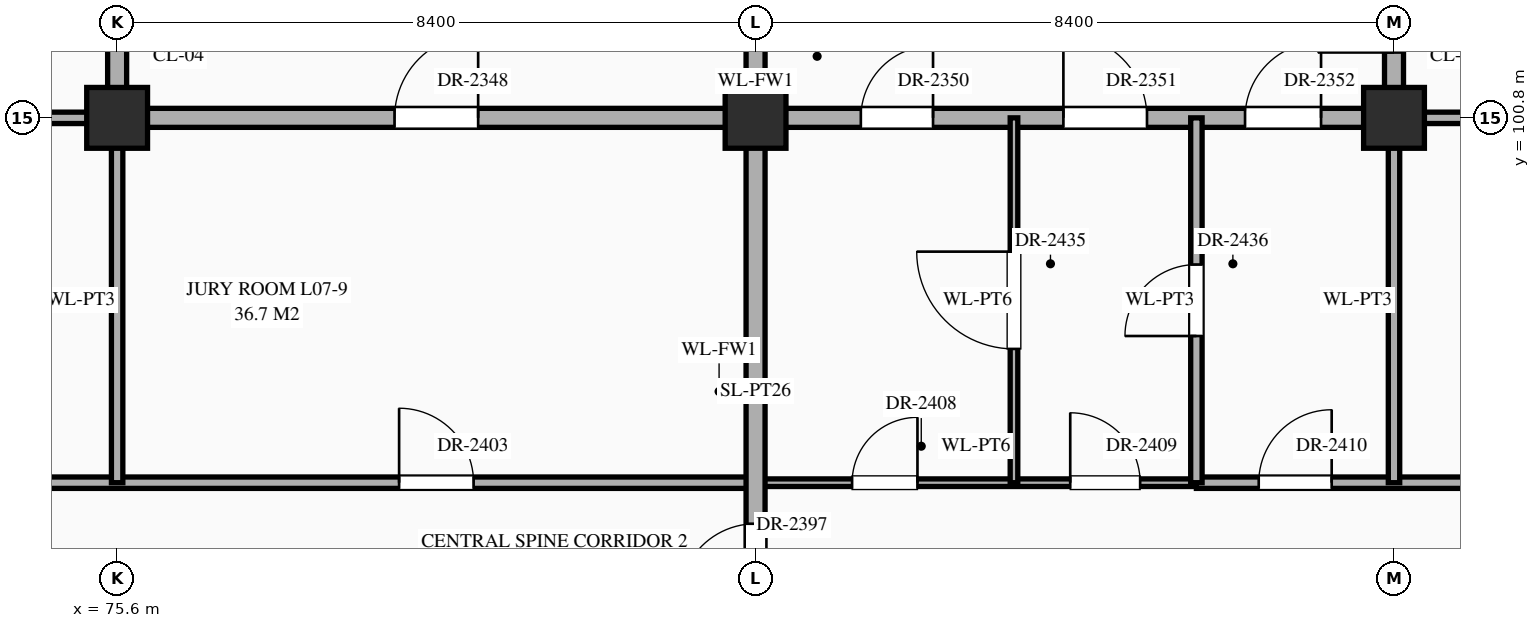
"""IFC4 building model, lengths in metres.
Left out: names, types, materials, properties, quantities, classifications, styles, units other than length and angle.
Written with IfcOpenShell. Run it as: python <this file> out.ifc"""

import sys

from ifc_helpers import new_model, si_unit, direction, frame, frame_2d, origin, origin_2d, place, context, subcontext, project, spatial, rectangle, extrude, element, fill, save


model = new_model("IFC4")
c1 = context("Model", 3, precision=1e-05, world=origin(), true_north=direction((0.0, 1.0)))
c2 = subcontext(c1, "Body", "Model", "MODEL_VIEW")
j1 = project(units=[si_unit("LENGTHUNIT", "METRE"), si_unit("PLANEANGLEUNIT", "RADIAN")], contexts=[c1])
p1 = place(None, origin())
s1 = spatial("IfcSite", under=j1, at=p1, CompositionType="ELEMENT")
p2 = place(p1, origin())
s2 = spatial("IfcBuilding", under=s1, at=p2, CompositionType="ELEMENT")
p3 = place(p2, frame((0.0, 0.0, 30.6)))
s3 = spatial("IfcBuildingStorey", under=s2, at=p3, CompositionType="ELEMENT", Elevation=30.6)
for number, where, z_axis, x_axis in (
    (1, (75.6, 100.8, 0.0), (0.0, 0.0, 1.0), (1.0, 0.0, 0.0)),
    (2, (84.0, 100.8, 0.0), (0.0, 0.0, 1.0), (1.0, 0.0, 0.0)),
    (3, (92.4, 100.8, 0.0), (0.0, 0.0, 1.0), (1.0, 0.0, 0.0)),
):
    element("IfcColumn", number, at=place(p3, frame(where, z_axis=z_axis, x_axis=x_axis)), inside=s3, PredefinedType="COLUMN", context=c2, shape_type="SweptSolid", body=[
        extrude(rectangle(XDim=0.8, YDim=0.8, at=origin_2d()), origin(), (0.0, 0.0, 1.0), 4.5),
    ])
p4 = place(p3, frame((56.2, 96.0, 0.0), z_axis=(0.0, 0.0, 1.0), x_axis=(1.0, 0.0, 0.0)))
e4 = element("IfcWall", 4, at=p4, inside=s3, PredefinedType="STANDARD", context=c2, shape_type="SweptSolid", body=[
    extrude(rectangle(XDim=27.8, YDim=0.15, at=frame_2d((13.9, 0.0))), origin(), (0.0, 0.0, 1.0), 4.24),
])
p5 = place(p4, frame((0.68, 0.0, 0.0)))
e5 = element("IfcOpeningElement", 5, at=p5, cuts=e4, PredefinedType="OPENING", context=c2, shape_type="SweptSolid", body=[
    extrude(rectangle(XDim=1.24, YDim=2.3, at=frame_2d((0.62, 1.15))), frame((0.0, 0.087, 0.0), z_axis=(0.0, -1.0, 0.0), x_axis=(1.0, 0.0, 0.0)), (0.0, 0.0, 1.0), 0.174),
])
p6 = place(p4, frame((6.16, 0.0, 0.0)))
e6 = element("IfcOpeningElement", 6, at=p6, cuts=e4, PredefinedType="OPENING", context=c2, shape_type="SweptSolid", body=[
    extrude(rectangle(XDim=1.28, YDim=2.35, at=frame_2d((0.64, 1.175))), frame((0.0, 0.087, 0.0), z_axis=(0.0, -1.0, 0.0), x_axis=(1.0, 0.0, 0.0)), (0.0, 0.0, 1.0), 0.174),
])
p7 = place(p4, frame((14.73, 0.0, 0.0)))
e7 = element("IfcOpeningElement", 7, at=p7, cuts=e4, PredefinedType="OPENING", context=c2, shape_type="SweptSolid", body=[
    extrude(rectangle(XDim=0.94, YDim=2.3, at=frame_2d((0.47, 1.15))), frame((0.0, 0.087, 0.0), z_axis=(0.0, -1.0, 0.0), x_axis=(1.0, 0.0, 0.0)), (0.0, 0.0, 1.0), 0.174),
])
p8 = place(p4, frame((23.11, 0.0, 0.0)))
e8 = element("IfcOpeningElement", 8, at=p8, cuts=e4, PredefinedType="OPENING", context=c2, shape_type="SweptSolid", body=[
    extrude(rectangle(XDim=0.98, YDim=2.35, at=frame_2d((0.49, 1.175))), frame((0.0, 0.087, 0.0), z_axis=(0.0, -1.0, 0.0), x_axis=(1.0, 0.0, 0.0)), (0.0, 0.0, 1.0), 0.174),
])
p9 = place(p3, frame((84.0, 96.0, 0.0), z_axis=(0.0, 0.0, 1.0), x_axis=(1.0, 0.0, 0.0)))
e9 = element("IfcWall", 9, at=p9, inside=s3, PredefinedType="STANDARD", context=c2, shape_type="SweptSolid", body=[
    extrude(rectangle(XDim=5.8, YDim=0.1, at=frame_2d((2.9, 0.0))), origin(), (0.0, 0.0, 1.0), 4.24),
])
p10 = place(p9, frame((1.27, 0.0, 0.0)))
e10 = element("IfcOpeningElement", 10, at=p10, cuts=e9, PredefinedType="OPENING", context=c2, shape_type="SweptSolid", body=[
    extrude(rectangle(XDim=0.86, YDim=2.1, at=frame_2d((0.43, 1.05))), frame((0.0, 0.062, 0.0), z_axis=(0.0, -1.0, 0.0), x_axis=(1.0, 0.0, 0.0)), (0.0, 0.0, 1.0), 0.124),
])
p11 = place(p9, frame((4.14, 0.0, 0.0)))
e11 = element("IfcOpeningElement", 11, at=p11, cuts=e9, PredefinedType="OPENING", context=c2, shape_type="SweptSolid", body=[
    extrude(rectangle(XDim=0.92, YDim=2.15, at=frame_2d((0.46, 1.075))), frame((0.0, 0.062, 0.0), z_axis=(0.0, -1.0, 0.0), x_axis=(1.0, 0.0, 0.0)), (0.0, 0.0, 1.0), 0.124),
])
p12 = place(p3, frame((89.8, 96.0, 0.0), z_axis=(0.0, 0.0, 1.0), x_axis=(1.0, 0.0, 0.0)))
e12 = element("IfcWall", 12, at=p12, inside=s3, PredefinedType="STANDARD", context=c2, shape_type="SweptSolid", body=[
    extrude(rectangle(XDim=19.4, YDim=0.15, at=frame_2d((9.7, 0.0))), origin(), (0.0, 0.0, 1.0), 4.24),
])
p13 = place(p12, frame((0.82, 0.0, 0.0)))
e13 = element("IfcOpeningElement", 13, at=p13, cuts=e12, PredefinedType="OPENING", context=c2, shape_type="SweptSolid", body=[
    extrude(rectangle(XDim=0.96, YDim=2.2, at=frame_2d((0.48, 1.1))), frame((0.0, 0.087, 0.0), z_axis=(0.0, -1.0, 0.0), x_axis=(1.0, 0.0, 0.0)), (0.0, 0.0, 1.0), 0.174),
])
p14 = place(p12, frame((6.3, 0.0, 0.0)))
e14 = element("IfcOpeningElement", 14, at=p14, cuts=e12, PredefinedType="OPENING", context=c2, shape_type="SweptSolid", body=[
    extrude(rectangle(XDim=1.0, YDim=2.25, at=frame_2d((0.5, 1.125))), frame((0.0, 0.087, 0.0), z_axis=(0.0, -1.0, 0.0), x_axis=(1.0, 0.0, 0.0)), (0.0, 0.0, 1.0), 0.174),
])
p15 = place(p12, frame((14.68, 0.0, 0.0)))
e15 = element("IfcOpeningElement", 15, at=p15, cuts=e12, PredefinedType="OPENING", context=c2, shape_type="SweptSolid", body=[
    extrude(rectangle(XDim=1.04, YDim=2.2, at=frame_2d((0.52, 1.1))), frame((0.0, 0.087, 0.0), z_axis=(0.0, -1.0, 0.0), x_axis=(1.0, 0.0, 0.0)), (0.0, 0.0, 1.0), 0.174),
])
p16 = place(p3, frame((71.4, 100.8, 0.0), z_axis=(0.0, 0.0, 1.0), x_axis=(1.0, 0.0, 0.0)))
e16 = element("IfcWall", 16, at=p16, inside=s3, PredefinedType="STANDARD", context=c2, shape_type="SweptSolid", body=[
    extrude(rectangle(XDim=4.2, YDim=0.15, at=frame_2d((2.1, 0.0))), origin(), (0.0, 0.0, 1.0), 3.39),
])
p17 = place(p16, frame((1.36, 0.0, 0.0)))
e17 = element("IfcOpeningElement", 17, at=p17, cuts=e16, PredefinedType="OPENING", context=c2, shape_type="SweptSolid", body=[
    extrude(rectangle(XDim=1.16, YDim=2.3, at=frame_2d((0.58, 1.15))), frame((0.0, 0.087, 0.0), z_axis=(0.0, -1.0, 0.0), x_axis=(1.0, 0.0, 0.0)), (0.0, 0.0, 1.0), 0.174),
])
p18 = place(p3, frame((75.6, 100.8, 0.0), z_axis=(0.0, 0.0, 1.0), x_axis=(1.0, 0.0, 0.0)))
e18 = element("IfcWall", 18, at=p18, inside=s3, PredefinedType="STANDARD", context=c2, shape_type="SweptSolid", body=[
    extrude(rectangle(XDim=16.8, YDim=0.25, at=frame_2d((8.4, 0.0))), origin(), (0.0, 0.0, 1.0), 3.39),
])
p19 = place(p18, frame((3.65, 0.0, 0.0)))
e19 = element("IfcOpeningElement", 19, at=p19, cuts=e18, PredefinedType="OPENING", context=c2, shape_type="SweptSolid", body=[
    extrude(rectangle(XDim=1.1, YDim=2.2, at=frame_2d((0.55, 1.1))), frame((0.0, 0.137, 0.0), z_axis=(0.0, -1.0, 0.0), x_axis=(1.0, 0.0, 0.0)), (0.0, 0.0, 1.0), 0.274),
])
p20 = place(p18, frame((9.785, 0.0, 0.0)))
e20 = element("IfcOpeningElement", 20, at=p20, cuts=e18, PredefinedType="OPENING", context=c2, shape_type="SweptSolid", body=[
    extrude(rectangle(XDim=0.95, YDim=2.15, at=frame_2d((0.475, 1.075))), frame((0.0, 0.137, 0.0), z_axis=(0.0, -1.0, 0.0), x_axis=(1.0, 0.0, 0.0)), (0.0, 0.0, 1.0), 0.274),
])
p21 = place(p18, frame((12.45, 0.0, 0.0)))
e21 = element("IfcOpeningElement", 21, at=p21, cuts=e18, PredefinedType="OPENING", context=c2, shape_type="SweptSolid", body=[
    extrude(rectangle(XDim=1.1, YDim=2.2, at=frame_2d((0.55, 1.1))), frame((0.0, 0.137, 0.0), z_axis=(0.0, -1.0, 0.0), x_axis=(1.0, 0.0, 0.0)), (0.0, 0.0, 1.0), 0.274),
])
p22 = place(p18, frame((14.84, 0.0, 0.0)))
e22 = element("IfcOpeningElement", 22, at=p22, cuts=e18, PredefinedType="OPENING", context=c2, shape_type="SweptSolid", body=[
    extrude(rectangle(XDim=1.0, YDim=2.2, at=frame_2d((0.5, 1.1))), frame((0.0, 0.137, 0.0), z_axis=(0.0, -1.0, 0.0), x_axis=(1.0, 0.0, 0.0)), (0.0, 0.0, 1.0), 0.274),
])
p23 = place(p3, frame((92.4, 100.8, 0.0), z_axis=(0.0, 0.0, 1.0), x_axis=(1.0, 0.0, 0.0)))
e23 = element("IfcWall", 23, at=p23, inside=s3, PredefinedType="STANDARD", context=c2, shape_type="SweptSolid", body=[
    extrude(rectangle(XDim=4.2, YDim=0.15, at=frame_2d((2.1, 0.0))), origin(), (0.0, 0.0, 1.0), 3.39),
])
p24 = place(p23, frame((1.77, 0.0, 0.0)))
e24 = element("IfcOpeningElement", 24, at=p24, cuts=e23, PredefinedType="OPENING", context=c2, shape_type="SweptSolid", body=[
    extrude(rectangle(XDim=0.98, YDim=2.35, at=frame_2d((0.49, 1.175))), frame((0.0, 0.087, 0.0), z_axis=(0.0, -1.0, 0.0), x_axis=(1.0, 0.0, 0.0)), (0.0, 0.0, 1.0), 0.174),
])
p25 = place(p3, frame((75.6, 96.0, 0.0), z_axis=(0.0, 0.0, 1.0), x_axis=(0.0, 1.0, 0.0)))
e25 = element("IfcWall", 25, at=p25, inside=s3, PredefinedType="STANDARD", context=c2, shape_type="SweptSolid", body=[
    extrude(rectangle(XDim=4.8, YDim=0.15, at=frame_2d((2.4, 0.0))), origin(), (0.0, 0.0, 1.0), 3.49),
])
p26 = place(p3, frame((75.6, 100.8, 0.0), z_axis=(0.0, 0.0, 1.0), x_axis=(0.0, 1.0, 0.0)))
e26 = element("IfcWall", 26, at=p26, inside=s3, PredefinedType="STANDARD", context=c2, shape_type="SweptSolid", body=[
    extrude(rectangle(XDim=3.6, YDim=0.25, at=frame_2d((1.8, 0.0))), origin(), (0.0, 0.0, 1.0), 3.49),
])
p27 = place(p26, frame((0.885, 0.0, 0.0)))
e27 = element("IfcOpeningElement", 27, at=p27, cuts=e26, PredefinedType="OPENING", context=c2, shape_type="SweptSolid", body=[
    extrude(rectangle(XDim=0.95, YDim=2.15, at=frame_2d((0.475, 1.075))), frame((0.0, 0.137, 0.0), z_axis=(0.0, -1.0, 0.0), x_axis=(1.0, 0.0, 0.0)), (0.0, 0.0, 1.0), 0.274),
])
p28 = place(p3, frame((84.0, 79.24, 0.0), z_axis=(0.0, 0.0, 1.0), x_axis=(0.0, 1.0, 0.0)))
e28 = element("IfcWall", 28, at=p28, inside=s3, PredefinedType="STANDARD", context=c2, shape_type="SweptSolid", body=[
    extrude(rectangle(XDim=35.92, YDim=0.25, at=frame_2d((17.96, 0.0))), origin(), (0.0, 0.0, 1.0), 3.49),
])
p29 = place(p28, frame((22.77, 0.0, 0.0)))
e29 = element("IfcOpeningElement", 29, at=p29, cuts=e28, PredefinedType="OPENING", context=c2, shape_type="SweptSolid", body=[
    extrude(rectangle(XDim=1.5, YDim=2.25, at=frame_2d((0.75, 1.125))), frame((0.0, 0.137, 0.0), z_axis=(0.0, -1.0, 0.0), x_axis=(1.0, 0.0, 0.0)), (0.0, 0.0, 1.0), 0.274),
])
p30 = place(p28, frame((12.525, 0.0, 0.0)))
e30 = element("IfcOpeningElement", 30, at=p30, cuts=e28, PredefinedType="OPENING", context=c2, shape_type="SweptSolid", body=[
    extrude(rectangle(XDim=0.95, YDim=2.15, at=frame_2d((0.475, 1.075))), frame((0.0, 0.137, 0.0), z_axis=(0.0, -1.0, 0.0), x_axis=(1.0, 0.0, 0.0)), (0.0, 0.0, 1.0), 0.274),
])
p31 = place(p28, frame((15.22, 0.0, 0.0)))
e31 = element("IfcOpeningElement", 31, at=p31, cuts=e28, PredefinedType="OPENING", context=c2, shape_type="SweptSolid", body=[
    extrude(rectangle(XDim=1.0, YDim=2.2, at=frame_2d((0.5, 1.1))), frame((0.0, 0.137, 0.0), z_axis=(0.0, -1.0, 0.0), x_axis=(1.0, 0.0, 0.0)), (0.0, 0.0, 1.0), 0.274),
])
p32 = place(p28, frame((25.8, 0.0, 0.0)))
e32 = element("IfcOpeningElement", 32, at=p32, cuts=e28, PredefinedType="OPENING", context=c2, shape_type="SweptSolid", body=[
    extrude(rectangle(XDim=2.0, YDim=2.4, at=frame_2d((1.0, 1.2))), frame((0.0, 0.137, 0.0), z_axis=(0.0, -1.0, 0.0), x_axis=(1.0, 0.0, 0.0)), (0.0, 0.0, 1.0), 0.274),
])
p33 = place(p28, frame((29.57, 0.0, 0.0)))
e33 = element("IfcOpeningElement", 33, at=p33, cuts=e28, PredefinedType="OPENING", context=c2, shape_type="SweptSolid", body=[
    extrude(rectangle(XDim=1.1, YDim=2.2, at=frame_2d((0.55, 1.1))), frame((0.0, 0.137, 0.0), z_axis=(0.0, -1.0, 0.0), x_axis=(1.0, 0.0, 0.0)), (0.0, 0.0, 1.0), 0.274),
])
p34 = place(p28, frame((5.25, 0.0, 0.0)))
e34 = element("IfcOpeningElement", 34, at=p34, cuts=e28, PredefinedType="OPENING", context=c2, shape_type="SweptSolid", body=[
    extrude(rectangle(XDim=1.1, YDim=2.2, at=frame_2d((0.55, 1.1))), frame((0.0, 0.137, 0.0), z_axis=(0.0, -1.0, 0.0), x_axis=(1.0, 0.0, 0.0)), (0.0, 0.0, 1.0), 0.274),
])
p35 = place(p3, frame((87.4, 96.0, 0.0), z_axis=(0.0, 0.0, 1.0), x_axis=(0.0, 1.0, 0.0)))
e35 = element("IfcWall", 35, at=p35, inside=s3, PredefinedType="STANDARD", context=c2, shape_type="SweptSolid", body=[
    extrude(rectangle(XDim=4.8, YDim=0.1, at=frame_2d((2.4, 0.0))), origin(), (0.0, 0.0, 1.0), 4.24),
])
p36 = place(p35, frame((1.76, 0.0, 0.0)))
e36 = element("IfcOpeningElement", 36, at=p36, cuts=e35, PredefinedType="OPENING", context=c2, shape_type="SweptSolid", body=[
    extrude(rectangle(XDim=1.28, YDim=2.35, at=frame_2d((0.64, 1.175))), frame((0.0, 0.062, 0.0), z_axis=(0.0, -1.0, 0.0), x_axis=(1.0, 0.0, 0.0)), (0.0, 0.0, 1.0), 0.124),
])
p37 = place(p3, frame((89.8, 96.0, 0.0), z_axis=(0.0, 0.0, 1.0), x_axis=(0.0, 1.0, 0.0)))
e37 = element("IfcWall", 37, at=p37, inside=s3, PredefinedType="STANDARD", context=c2, shape_type="SweptSolid", body=[
    extrude(rectangle(XDim=4.8, YDim=0.15, at=frame_2d((2.4, 0.0))), origin(), (0.0, 0.0, 1.0), 4.24),
])
p38 = place(p37, frame((1.93, 0.0, 0.0)))
e38 = element("IfcOpeningElement", 38, at=p38, cuts=e37, PredefinedType="OPENING", context=c2, shape_type="SweptSolid", body=[
    extrude(rectangle(XDim=0.94, YDim=2.3, at=frame_2d((0.47, 1.15))), frame((0.0, 0.087, 0.0), z_axis=(0.0, -1.0, 0.0), x_axis=(1.0, 0.0, 0.0)), (0.0, 0.0, 1.0), 0.174),
])
p39 = place(p3, frame((92.4, 96.0, 0.0), z_axis=(0.0, 0.0, 1.0), x_axis=(0.0, 1.0, 0.0)))
e39 = element("IfcWall", 39, at=p39, inside=s3, PredefinedType="STANDARD", context=c2, shape_type="SweptSolid", body=[
    extrude(rectangle(XDim=4.8, YDim=0.15, at=frame_2d((2.4, 0.0))), origin(), (0.0, 0.0, 1.0), 3.49),
])
p40 = place(p3, frame((92.4, 100.8, 0.0), z_axis=(0.0, 0.0, 1.0), x_axis=(0.0, 1.0, 0.0)))
e40 = element("IfcWall", 40, at=p40, inside=s3, PredefinedType="STANDARD", context=c2, shape_type="SweptSolid", body=[
    extrude(rectangle(XDim=3.6, YDim=0.25, at=frame_2d((1.8, 0.0))), origin(), (0.0, 0.0, 1.0), 3.49),
])
p41 = place(p40, frame((0.86, 0.0, 0.0)))
e41 = element("IfcOpeningElement", 41, at=p41, cuts=e40, PredefinedType="OPENING", context=c2, shape_type="SweptSolid", body=[
    extrude(rectangle(XDim=1.0, YDim=2.2, at=frame_2d((0.5, 1.1))), frame((0.0, 0.137, 0.0), z_axis=(0.0, -1.0, 0.0), x_axis=(1.0, 0.0, 0.0)), (0.0, 0.0, 1.0), 0.274),
])
p42 = place(p19, origin())
e42 = element("IfcDoor", 42, at=p42, inside=s3, OperationType="SINGLE_SWING_RIGHT", PredefinedType="DOOR", context=c2, shape_type="SweptSolid", body=[
    extrude(rectangle(XDim=1.1, YDim=2.2, at=frame_2d((0.55, 1.1))), frame((0.0, 0.025, 0.0), z_axis=(0.0, -1.0, 0.0), x_axis=(1.0, 0.0, 0.0)), (0.0, 0.0, 1.0), 0.05),
])
fill(e19, e42)
p43 = place(p20, origin())
e43 = element("IfcDoor", 43, at=p43, inside=s3, OperationType="SINGLE_SWING_RIGHT", PredefinedType="DOOR", context=c2, shape_type="SweptSolid", body=[
    extrude(rectangle(XDim=0.95, YDim=2.15, at=frame_2d((0.475, 1.075))), frame((0.0, 0.025, 0.0), z_axis=(0.0, -1.0, 0.0), x_axis=(1.0, 0.0, 0.0)), (0.0, 0.0, 1.0), 0.05),
])
fill(e20, e43)
p44 = place(p21, origin())
e44 = element("IfcDoor", 44, at=p44, inside=s3, OperationType="SINGLE_SWING_LEFT", PredefinedType="DOOR", context=c2, shape_type="SweptSolid", body=[
    extrude(rectangle(XDim=1.1, YDim=2.2, at=frame_2d((0.55, 1.1))), frame((0.0, 0.025, 0.0), z_axis=(0.0, -1.0, 0.0), x_axis=(1.0, 0.0, 0.0)), (0.0, 0.0, 1.0), 0.05),
])
fill(e21, e44)
p45 = place(p22, origin())
e45 = element("IfcDoor", 45, at=p45, inside=s3, OperationType="SINGLE_SWING_RIGHT", PredefinedType="DOOR", context=c2, shape_type="SweptSolid", body=[
    extrude(rectangle(XDim=1.0, YDim=2.2, at=frame_2d((0.5, 1.1))), frame((0.0, 0.025, 0.0), z_axis=(0.0, -1.0, 0.0), x_axis=(1.0, 0.0, 0.0)), (0.0, 0.0, 1.0), 0.05),
])
fill(e22, e45)
p46 = place(p31, origin())
e46 = element("IfcDoor", 46, at=p46, inside=s3, OperationType="SINGLE_SWING_LEFT", PredefinedType="DOOR", context=c2, shape_type="SweptSolid", body=[
    extrude(rectangle(XDim=1.0, YDim=2.2, at=frame_2d((0.5, 1.1))), frame((0.0, 0.025, 0.0), z_axis=(0.0, -1.0, 0.0), x_axis=(1.0, 0.0, 0.0)), (0.0, 0.0, 1.0), 0.05),
])
fill(e31, e46)
p47 = place(p8, origin())
e47 = element("IfcDoor", 47, at=p47, inside=s3, OperationType="SINGLE_SWING_LEFT", PredefinedType="DOOR", context=c2, shape_type="SweptSolid", body=[
    extrude(rectangle(XDim=0.98, YDim=2.35, at=frame_2d((0.49, 1.175))), frame((0.0, 0.025, 0.0), z_axis=(0.0, -1.0, 0.0), x_axis=(1.0, 0.0, 0.0)), (0.0, 0.0, 1.0), 0.05),
])
fill(e8, e47)
p48 = place(p10, origin())
e48 = element("IfcDoor", 48, at=p48, inside=s3, OperationType="SINGLE_SWING_RIGHT", PredefinedType="DOOR", context=c2, shape_type="SweptSolid", body=[
    extrude(rectangle(XDim=0.86, YDim=2.1, at=frame_2d((0.43, 1.05))), frame((0.0, 0.025, 0.0), z_axis=(0.0, -1.0, 0.0), x_axis=(1.0, 0.0, 0.0)), (0.0, 0.0, 1.0), 0.05),
])
fill(e10, e48)
p49 = place(p11, origin())
e49 = element("IfcDoor", 49, at=p49, inside=s3, OperationType="SINGLE_SWING_LEFT", PredefinedType="DOOR", context=c2, shape_type="SweptSolid", body=[
    extrude(rectangle(XDim=0.92, YDim=2.15, at=frame_2d((0.46, 1.075))), frame((0.0, 0.025, 0.0), z_axis=(0.0, -1.0, 0.0), x_axis=(1.0, 0.0, 0.0)), (0.0, 0.0, 1.0), 0.05),
])
fill(e11, e49)
p50 = place(p13, origin())
e50 = element("IfcDoor", 50, at=p50, inside=s3, OperationType="SINGLE_SWING_RIGHT", PredefinedType="DOOR", context=c2, shape_type="SweptSolid", body=[
    extrude(rectangle(XDim=0.96, YDim=2.2, at=frame_2d((0.48, 1.1))), frame((0.0, 0.025, 0.0), z_axis=(0.0, -1.0, 0.0), x_axis=(1.0, 0.0, 0.0)), (0.0, 0.0, 1.0), 0.05),
])
fill(e13, e50)
p51 = place(p36, origin())
e51 = element("IfcDoor", 51, at=p51, inside=s3, OperationType="SINGLE_SWING_RIGHT", PredefinedType="DOOR", context=c2, shape_type="SweptSolid", body=[
    extrude(rectangle(XDim=1.28, YDim=2.35, at=frame_2d((0.64, 1.175))), frame((0.0, 0.025, 0.0), z_axis=(0.0, -1.0, 0.0), x_axis=(1.0, 0.0, 0.0)), (0.0, 0.0, 1.0), 0.05),
])
fill(e36, e51)
p52 = place(p38, origin())
e52 = element("IfcDoor", 52, at=p52, inside=s3, OperationType="SINGLE_SWING_LEFT", PredefinedType="DOOR", context=c2, shape_type="SweptSolid", body=[
    extrude(rectangle(XDim=0.94, YDim=2.3, at=frame_2d((0.47, 1.15))), frame((0.0, 0.025, 0.0), z_axis=(0.0, -1.0, 0.0), x_axis=(1.0, 0.0, 0.0)), (0.0, 0.0, 1.0), 0.05),
])
fill(e38, e52)
save(model, sys.argv[1])
